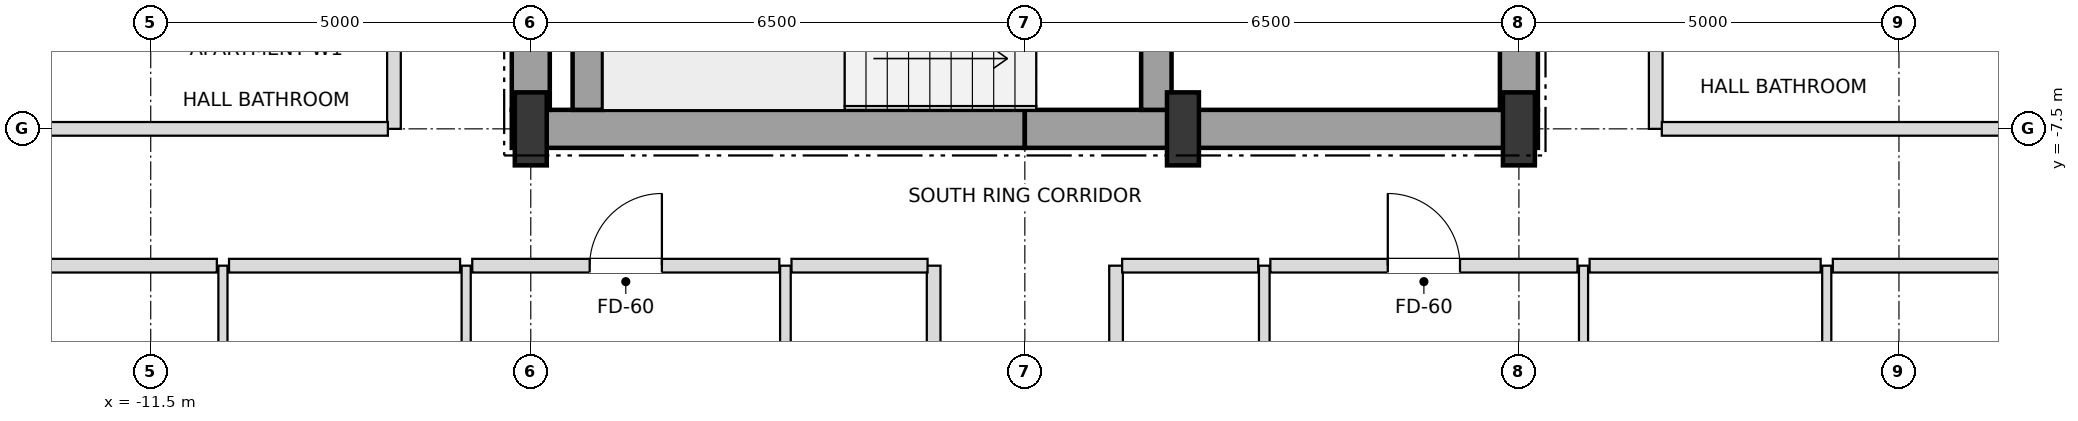
"""IFC4 building model, lengths in metres.
Left out: names, types, materials, properties, quantities, classifications, styles, units other than length and angle.
Written with IfcOpenShell. Run it as: python <this file> out.ifc"""

import sys

from ifc_helpers import new_model, si_unit, direction, frame, frame_2d, origin, origin_2d, place, context, subcontext, project, spatial, rectangle, i_section, extrude, element, fill, save


model = new_model("IFC4")
c1 = context("Model", 3, precision=1e-05, world=origin(), true_north=direction((0.0, 1.0)))
c2 = subcontext(c1, "Body", "Model", "MODEL_VIEW")
j1 = project(units=[si_unit("LENGTHUNIT", "METRE"), si_unit("PLANEANGLEUNIT", "RADIAN")], contexts=[c1])
p1 = place(None, origin())
s1 = spatial("IfcSite", under=j1, at=p1, CompositionType="ELEMENT")
p2 = place(p1, origin())
s2 = spatial("IfcBuilding", under=s1, at=p2, CompositionType="ELEMENT")
p3 = place(p2, frame((0.0, 0.0, 99.0)))
s3 = spatial("IfcBuildingStorey", under=s2, at=p3, CompositionType="ELEMENT", Elevation=99.0)
for number, where, z_axis, x_axis in (
    (1, (-6.5, -7.5, 0.0), (0.0, 0.0, 1.0), (1.0, 0.0, 0.0)),
    (2, (2.08, -7.5, 0.0), (0.0, 0.0, 1.0), (1.0, 0.0, 0.0)),
    (3, (6.5, -7.5, 0.0), (0.0, 0.0, 1.0), (1.0, 0.0, 0.0)),
):
    element("IfcColumn", number, at=place(p3, frame(where, z_axis=z_axis, x_axis=x_axis)), inside=s3, PredefinedType="COLUMN", context=c2, shape_type="SweptSolid", body=[
        extrude(i_section(OverallWidth=0.42, OverallDepth=0.96, WebThickness=0.022, FlangeThickness=0.034, at=origin_2d()), origin(), (0.0, 0.0, 1.0), 3.6),
    ])
for number, where, z_axis, x_axis in (
    (4, (-6.75, -7.5, 0.0), (0.0, 0.0, 1.0), (1.0, 0.0, 0.0)),
    (5, (0.0, -7.5, 0.0), (0.0, 0.0, 1.0), (1.0, 0.0, 0.0)),
):
    element("IfcWall", number, at=place(p3, frame(where, z_axis=z_axis, x_axis=x_axis)), inside=s3, PredefinedType="SHEAR", context=c2, shape_type="SweptSolid", body=[
        extrude(rectangle(XDim=6.75, YDim=0.5, at=frame_2d((3.375, 0.0))), origin(), (0.0, 0.0, 1.0), 3.38),
    ])
p4 = place(p3, frame((-6.5, -7.25, 0.0), z_axis=(0.0, 0.0, 1.0), x_axis=(0.0, 1.0, 0.0)))
e6 = element("IfcWall", 6, at=p4, inside=s3, PredefinedType="SHEAR", context=c2, shape_type="SweptSolid", body=[
    extrude(rectangle(XDim=3.55, YDim=0.5, at=frame_2d((1.775, 0.0))), origin(), (0.0, 0.0, 1.0), 3.38),
])
p5 = place(p3, frame((6.5, -7.25, 0.0), z_axis=(0.0, 0.0, 1.0), x_axis=(0.0, 1.0, 0.0)))
e7 = element("IfcWall", 7, at=p5, inside=s3, PredefinedType="SHEAR", context=c2, shape_type="SweptSolid", body=[
    extrude(rectangle(XDim=5.75, YDim=0.5, at=frame_2d((2.875, 0.0))), origin(), (0.0, 0.0, 1.0), 3.38),
])
p6 = place(p5, frame((0.85, 0.0, 0.0)))
e8 = element("IfcOpeningElement", 8, at=p6, cuts=e7, PredefinedType="OPENING", context=c2, shape_type="SweptSolid", body=[
    extrude(rectangle(XDim=1.05, YDim=2.15, at=frame_2d((0.525, 1.075))), frame((0.0, 0.26, 0.0), z_axis=(0.0, -1.0, 0.0), x_axis=(1.0, 0.0, 0.0)), (0.0, 0.0, 1.0), 0.52),
])
p7 = place(p3, frame((-5.75, -7.25, 0.0), z_axis=(0.0, 0.0, 1.0), x_axis=(0.0, 1.0, 0.0)))
e9 = element("IfcWall", 9, at=p7, inside=s3, PredefinedType="SHEAR", context=c2, shape_type="SweptSolid", body=[
    extrude(rectangle(XDim=2.9, YDim=0.4, at=frame_2d((1.45, 0.0))), origin(), (0.0, 0.0, 1.0), 3.38),
])
p8 = place(p3, frame((1.73, -7.25, 0.0), z_axis=(0.0, 0.0, 1.0), x_axis=(0.0, 1.0, 0.0)))
e10 = element("IfcWall", 10, at=p8, inside=s3, PredefinedType="SHEAR", context=c2, shape_type="SweptSolid", body=[
    extrude(rectangle(XDim=3.3, YDim=0.4, at=frame_2d((1.65, 0.0))), origin(), (0.0, 0.0, 1.0), 3.38),
])
p9 = place(p8, frame((0.9, 0.0, 0.0)))
e11 = element("IfcOpeningElement", 11, at=p9, cuts=e10, PredefinedType="OPENING", context=c2, shape_type="SweptSolid", body=[
    extrude(rectangle(XDim=1.05, YDim=2.15, at=frame_2d((0.525, 1.075))), frame((0.0, 0.21, 0.0), z_axis=(0.0, -1.0, 0.0), x_axis=(1.0, 0.0, 0.0)), (0.0, 0.0, 1.0), 0.42),
])
p10 = place(p3, frame((-10.55, -23.15, 0.0), z_axis=(0.0, 0.0, 1.0), x_axis=(0.0, 1.0, 0.0)))
e12 = element("IfcWall", 12, at=p10, inside=s3, PredefinedType="PARTITIONING", context=c2, shape_type="SweptSolid", body=[
    extrude(rectangle(XDim=13.85, YDim=0.12, at=frame_2d((6.925, 0.0))), origin(), (0.0, 0.0, 1.0), 2.816),
])
p11 = place(p10, frame((8.701, 0.0, 0.0)))
e13 = element("IfcOpeningElement", 13, at=p11, cuts=e12, PredefinedType="OPENING", context=c2, shape_type="SweptSolid", body=[
    extrude(rectangle(XDim=0.9, YDim=2.1, at=frame_2d((0.45, 1.05))), frame((0.0, 0.07, 0.0), z_axis=(0.0, -1.0, 0.0), x_axis=(1.0, 0.0, 0.0)), (0.0, 0.0, 1.0), 0.14),
])
p12 = place(p10, frame((1.399, 0.0, 0.0)))
e14 = element("IfcOpeningElement", 14, at=p12, cuts=e12, PredefinedType="OPENING", context=c2, shape_type="SweptSolid", body=[
    extrude(rectangle(XDim=0.9, YDim=2.1, at=frame_2d((0.45, 1.05))), frame((0.0, 0.07, 0.0), z_axis=(0.0, -1.0, 0.0), x_axis=(1.0, 0.0, 0.0)), (0.0, 0.0, 1.0), 0.14),
])
p13 = place(p3, frame((-8.3, -7.5, 0.0), z_axis=(0.0, 0.0, 1.0), x_axis=(0.0, 1.0, 0.0)))
e15 = element("IfcWall", 15, at=p13, inside=s3, PredefinedType="PARTITIONING", context=c2, shape_type="SweptSolid", body=[
    extrude(rectangle(XDim=15.0, YDim=0.18, at=frame_2d((7.5, 0.0))), origin(), (0.0, 0.0, 1.0), 3.38),
])
p14 = place(p13, frame((3.145, 0.0, 0.0)))
e16 = element("IfcOpeningElement", 16, at=p14, cuts=e15, PredefinedType="OPENING", context=c2, shape_type="SweptSolid", body=[
    extrude(rectangle(XDim=0.95, YDim=2.15, at=frame_2d((0.475, 1.075))), frame((0.0, 0.1, 0.0), z_axis=(0.0, -1.0, 0.0), x_axis=(1.0, 0.0, 0.0)), (0.0, 0.0, 1.0), 0.2),
])
p15 = place(p13, frame((10.645, 0.0, 0.0)))
e17 = element("IfcOpeningElement", 17, at=p15, cuts=e15, PredefinedType="OPENING", context=c2, shape_type="SweptSolid", body=[
    extrude(rectangle(XDim=0.95, YDim=2.15, at=frame_2d((0.475, 1.075))), frame((0.0, 0.1, 0.0), z_axis=(0.0, -1.0, 0.0), x_axis=(1.0, 0.0, 0.0)), (0.0, 0.0, 1.0), 0.2),
])
p16 = place(p3, frame((-7.35, -23.15, 0.0), z_axis=(0.0, 0.0, 1.0), x_axis=(0.0, 1.0, 0.0)))
e18 = element("IfcWall", 18, at=p16, inside=s3, PredefinedType="PARTITIONING", context=c2, shape_type="SweptSolid", body=[
    extrude(rectangle(XDim=13.85, YDim=0.12, at=frame_2d((6.925, 0.0))), origin(), (0.0, 0.0, 1.0), 2.816),
])
p17 = place(p16, frame((9.455, 0.0, 0.0)))
e19 = element("IfcOpeningElement", 19, at=p17, cuts=e18, PredefinedType="OPENING", context=c2, shape_type="SweptSolid", body=[
    extrude(rectangle(XDim=0.95, YDim=2.1, at=frame_2d((0.475, 1.05))), frame((0.0, 0.07, 0.0), z_axis=(0.0, -1.0, 0.0), x_axis=(1.0, 0.0, 0.0)), (0.0, 0.0, 1.0), 0.14),
])
p18 = place(p16, frame((1.399, 0.0, 0.0)))
e20 = element("IfcOpeningElement", 20, at=p18, cuts=e18, PredefinedType="OPENING", context=c2, shape_type="SweptSolid", body=[
    extrude(rectangle(XDim=0.9, YDim=2.1, at=frame_2d((0.45, 1.05))), frame((0.0, 0.07, 0.0), z_axis=(0.0, -1.0, 0.0), x_axis=(1.0, 0.0, 0.0)), (0.0, 0.0, 1.0), 0.14),
])
p19 = place(p3, frame((-3.15, -17.15, 0.0), z_axis=(0.0, 0.0, 1.0), x_axis=(0.0, 1.0, 0.0)))
e21 = element("IfcWall", 21, at=p19, inside=s3, PredefinedType="PARTITIONING", context=c2, shape_type="SweptSolid", body=[
    extrude(rectangle(XDim=7.85, YDim=0.14, at=frame_2d((3.925, 0.0))), origin(), (0.0, 0.0, 1.0), 3.38),
])
p20 = place(p19, frame((3.48, 0.0, 0.0)))
e22 = element("IfcOpeningElement", 22, at=p20, cuts=e21, PredefinedType="OPENING", context=c2, shape_type="SweptSolid", body=[
    extrude(rectangle(XDim=0.9, YDim=2.1, at=frame_2d((0.45, 1.05))), frame((0.0, 0.08, 0.0), z_axis=(0.0, -1.0, 0.0), x_axis=(1.0, 0.0, 0.0)), (0.0, 0.0, 1.0), 0.16),
])
for number, where, z_axis, x_axis in (
    (23, (-1.2, -23.15, 0.0), (0.0, 0.0, 1.0), (0.0, 1.0, 0.0)),
    (24, (1.2, -23.15, 0.0), (0.0, 0.0, 1.0), (0.0, 1.0, 0.0)),
):
    element("IfcWall", number, at=place(p3, frame(where, z_axis=z_axis, x_axis=x_axis)), inside=s3, PredefinedType="PARTITIONING", context=c2, shape_type="SweptSolid", body=[
        extrude(rectangle(XDim=13.85, YDim=0.18, at=frame_2d((6.925, 0.0))), origin(), (0.0, 0.0, 1.0), 2.816),
    ])
p21 = place(p3, frame((3.15, -17.15, 0.0), z_axis=(0.0, 0.0, 1.0), x_axis=(0.0, 1.0, 0.0)))
e25 = element("IfcWall", 25, at=p21, inside=s3, PredefinedType="PARTITIONING", context=c2, shape_type="SweptSolid", body=[
    extrude(rectangle(XDim=7.85, YDim=0.14, at=frame_2d((3.925, 0.0))), origin(), (0.0, 0.0, 1.0), 3.38),
])
p22 = place(p21, frame((3.48, 0.0, 0.0)))
e26 = element("IfcOpeningElement", 26, at=p22, cuts=e25, PredefinedType="OPENING", context=c2, shape_type="SweptSolid", body=[
    extrude(rectangle(XDim=0.9, YDim=2.1, at=frame_2d((0.45, 1.05))), frame((0.0, 0.08, 0.0), z_axis=(0.0, -1.0, 0.0), x_axis=(1.0, 0.0, 0.0)), (0.0, 0.0, 1.0), 0.16),
])
p23 = place(p3, frame((7.35, -17.15, 0.0), z_axis=(0.0, 0.0, 1.0), x_axis=(0.0, 1.0, 0.0)))
e27 = element("IfcWall", 27, at=p23, inside=s3, PredefinedType="PARTITIONING", context=c2, shape_type="SweptSolid", body=[
    extrude(rectangle(XDim=7.85, YDim=0.12, at=frame_2d((3.925, 0.0))), origin(), (0.0, 0.0, 1.0), 2.816),
])
p24 = place(p23, frame((3.455, 0.0, 0.0)))
e28 = element("IfcOpeningElement", 28, at=p24, cuts=e27, PredefinedType="OPENING", context=c2, shape_type="SweptSolid", body=[
    extrude(rectangle(XDim=0.95, YDim=2.1, at=frame_2d((0.475, 1.05))), frame((0.0, 0.07, 0.0), z_axis=(0.0, -1.0, 0.0), x_axis=(1.0, 0.0, 0.0)), (0.0, 0.0, 1.0), 0.14),
])
p25 = place(p3, frame((8.3, -7.5, 0.0), z_axis=(0.0, 0.0, 1.0), x_axis=(0.0, 1.0, 0.0)))
e29 = element("IfcWall", 29, at=p25, inside=s3, PredefinedType="PARTITIONING", context=c2, shape_type="SweptSolid", body=[
    extrude(rectangle(XDim=15.0, YDim=0.18, at=frame_2d((7.5, 0.0))), origin(), (0.0, 0.0, 1.0), 3.38),
])
p26 = place(p25, frame((3.475, 0.0, 0.0)))
e30 = element("IfcOpeningElement", 30, at=p26, cuts=e29, PredefinedType="OPENING", context=c2, shape_type="SweptSolid", body=[
    extrude(rectangle(XDim=0.95, YDim=2.15, at=frame_2d((0.475, 1.075))), frame((0.0, 0.1, 0.0), z_axis=(0.0, -1.0, 0.0), x_axis=(1.0, 0.0, 0.0)), (0.0, 0.0, 1.0), 0.2),
])
p27 = place(p3, frame((10.55, -23.15, 0.0), z_axis=(0.0, 0.0, 1.0), x_axis=(0.0, 1.0, 0.0)))
e31 = element("IfcWall", 31, at=p27, inside=s3, PredefinedType="PARTITIONING", context=c2, shape_type="SweptSolid", body=[
    extrude(rectangle(XDim=13.85, YDim=0.12, at=frame_2d((6.925, 0.0))), origin(), (0.0, 0.0, 1.0), 2.816),
])
p28 = place(p27, frame((8.681, 0.0, 0.0)))
e32 = element("IfcOpeningElement", 32, at=p28, cuts=e31, PredefinedType="OPENING", context=c2, shape_type="SweptSolid", body=[
    extrude(rectangle(XDim=0.95, YDim=2.1, at=frame_2d((0.475, 1.05))), frame((0.0, 0.07, 0.0), z_axis=(0.0, -1.0, 0.0), x_axis=(1.0, 0.0, 0.0)), (0.0, 0.0, 1.0), 0.14),
])
p29 = place(p27, frame((1.399, 0.0, 0.0)))
e33 = element("IfcOpeningElement", 33, at=p29, cuts=e31, PredefinedType="OPENING", context=c2, shape_type="SweptSolid", body=[
    extrude(rectangle(XDim=0.9, YDim=2.1, at=frame_2d((0.45, 1.05))), frame((0.0, 0.07, 0.0), z_axis=(0.0, -1.0, 0.0), x_axis=(1.0, 0.0, 0.0)), (0.0, 0.0, 1.0), 0.14),
])
p30 = place(p3, frame((-15.57, -9.3, 0.0), z_axis=(0.0, 0.0, 1.0), x_axis=(1.0, 0.0, 0.0)))
e34 = element("IfcWall", 34, at=p30, inside=s3, PredefinedType="PARTITIONING", context=c2, shape_type="SweptSolid", body=[
    extrude(rectangle(XDim=4.94, YDim=0.18, at=frame_2d((2.47, 0.0))), origin(), (0.0, 0.0, 1.0), 3.38),
])
p31 = place(p3, frame((-10.47, -9.3, 0.0), z_axis=(0.0, 0.0, 1.0), x_axis=(1.0, 0.0, 0.0)))
e35 = element("IfcWall", 35, at=p31, inside=s3, PredefinedType="PARTITIONING", context=c2, shape_type="SweptSolid", body=[
    extrude(rectangle(XDim=3.04, YDim=0.18, at=frame_2d((1.52, 0.0))), origin(), (0.0, 0.0, 1.0), 3.38),
])
p32 = place(p3, frame((-7.27, -9.3, 0.0), z_axis=(0.0, 0.0, 1.0), x_axis=(1.0, 0.0, 0.0)))
e36 = element("IfcWall", 36, at=p32, inside=s3, PredefinedType="PARTITIONING", context=c2, shape_type="SweptSolid", body=[
    extrude(rectangle(XDim=4.04, YDim=0.18, at=frame_2d((2.02, 0.0))), origin(), (0.0, 0.0, 1.0), 2.816),
])
p33 = place(p32, frame((1.545, 0.0, 0.0)))
e37 = element("IfcOpeningElement", 37, at=p33, cuts=e36, PredefinedType="OPENING", context=c2, shape_type="SweptSolid", body=[
    extrude(rectangle(XDim=0.95, YDim=2.15, at=frame_2d((0.475, 1.075))), frame((0.0, 0.1, 0.0), z_axis=(0.0, -1.0, 0.0), x_axis=(1.0, 0.0, 0.0)), (0.0, 0.0, 1.0), 0.2),
])
for number, where, z_axis, x_axis in (
    (38, (-3.07, -9.3, 0.0), (0.0, 0.0, 1.0), (1.0, 0.0, 0.0)),
    (39, (1.28, -9.3, 0.0), (0.0, 0.0, 1.0), (1.0, 0.0, 0.0)),
):
    element("IfcWall", number, at=place(p3, frame(where, z_axis=z_axis, x_axis=x_axis)), inside=s3, PredefinedType="PARTITIONING", context=c2, shape_type="SweptSolid", body=[
        extrude(rectangle(XDim=1.79, YDim=0.18, at=frame_2d((0.895, 0.0))), origin(), (0.0, 0.0, 1.0), 3.38),
    ])
p34 = place(p3, frame((3.23, -9.3, 0.0), z_axis=(0.0, 0.0, 1.0), x_axis=(1.0, 0.0, 0.0)))
e40 = element("IfcWall", 40, at=p34, inside=s3, PredefinedType="PARTITIONING", context=c2, shape_type="SweptSolid", body=[
    extrude(rectangle(XDim=4.04, YDim=0.18, at=frame_2d((2.02, 0.0))), origin(), (0.0, 0.0, 1.0), 2.816),
])
p35 = place(p34, frame((1.545, 0.0, 0.0)))
e41 = element("IfcOpeningElement", 41, at=p35, cuts=e40, PredefinedType="OPENING", context=c2, shape_type="SweptSolid", body=[
    extrude(rectangle(XDim=0.95, YDim=2.15, at=frame_2d((0.475, 1.075))), frame((0.0, 0.1, 0.0), z_axis=(0.0, -1.0, 0.0), x_axis=(1.0, 0.0, 0.0)), (0.0, 0.0, 1.0), 0.2),
])
p36 = place(p3, frame((7.43, -9.3, 0.0), z_axis=(0.0, 0.0, 1.0), x_axis=(1.0, 0.0, 0.0)))
e42 = element("IfcWall", 42, at=p36, inside=s3, PredefinedType="PARTITIONING", context=c2, shape_type="SweptSolid", body=[
    extrude(rectangle(XDim=3.04, YDim=0.18, at=frame_2d((1.52, 0.0))), origin(), (0.0, 0.0, 1.0), 3.38),
])
p37 = place(p3, frame((10.63, -9.3, 0.0), z_axis=(0.0, 0.0, 1.0), x_axis=(1.0, 0.0, 0.0)))
e43 = element("IfcWall", 43, at=p37, inside=s3, PredefinedType="PARTITIONING", context=c2, shape_type="SweptSolid", body=[
    extrude(rectangle(XDim=4.94, YDim=0.18, at=frame_2d((2.47, 0.0))), origin(), (0.0, 0.0, 1.0), 3.38),
])
for number, where, z_axis, x_axis in (
    (44, (-14.27, -7.5, 0.0), (0.0, 0.0, 1.0), (1.0, 0.0, 0.0)),
    (45, (8.38, -7.5, 0.0), (0.0, 0.0, 1.0), (1.0, 0.0, 0.0)),
):
    element("IfcWall", number, at=place(p3, frame(where, z_axis=z_axis, x_axis=x_axis)), inside=s3, PredefinedType="PARTITIONING", context=c2, shape_type="SweptSolid", body=[
        extrude(rectangle(XDim=5.89, YDim=0.18, at=frame_2d((2.945, 0.0))), origin(), (0.0, 0.0, 1.0), 2.816),
    ])
p38 = place(p33, origin())
e46 = element("IfcDoor", 46, at=p38, inside=s3, OperationType="SINGLE_SWING_RIGHT", PredefinedType="DOOR", context=c2, shape_type="SweptSolid", body=[
    extrude(rectangle(XDim=0.95, YDim=2.15, at=frame_2d((0.475, 1.075))), frame((0.0, 0.025, 0.0), z_axis=(0.0, -1.0, 0.0), x_axis=(1.0, 0.0, 0.0)), (0.0, 0.0, 1.0), 0.05),
])
fill(e37, e46)
p39 = place(p35, origin())
e47 = element("IfcDoor", 47, at=p39, inside=s3, OperationType="SINGLE_SWING_LEFT", PredefinedType="DOOR", context=c2, shape_type="SweptSolid", body=[
    extrude(rectangle(XDim=0.95, YDim=2.15, at=frame_2d((0.475, 1.075))), frame((0.0, 0.025, 0.0), z_axis=(0.0, -1.0, 0.0), x_axis=(1.0, 0.0, 0.0)), (0.0, 0.0, 1.0), 0.05),
])
fill(e41, e47)
save(model, sys.argv[1])
